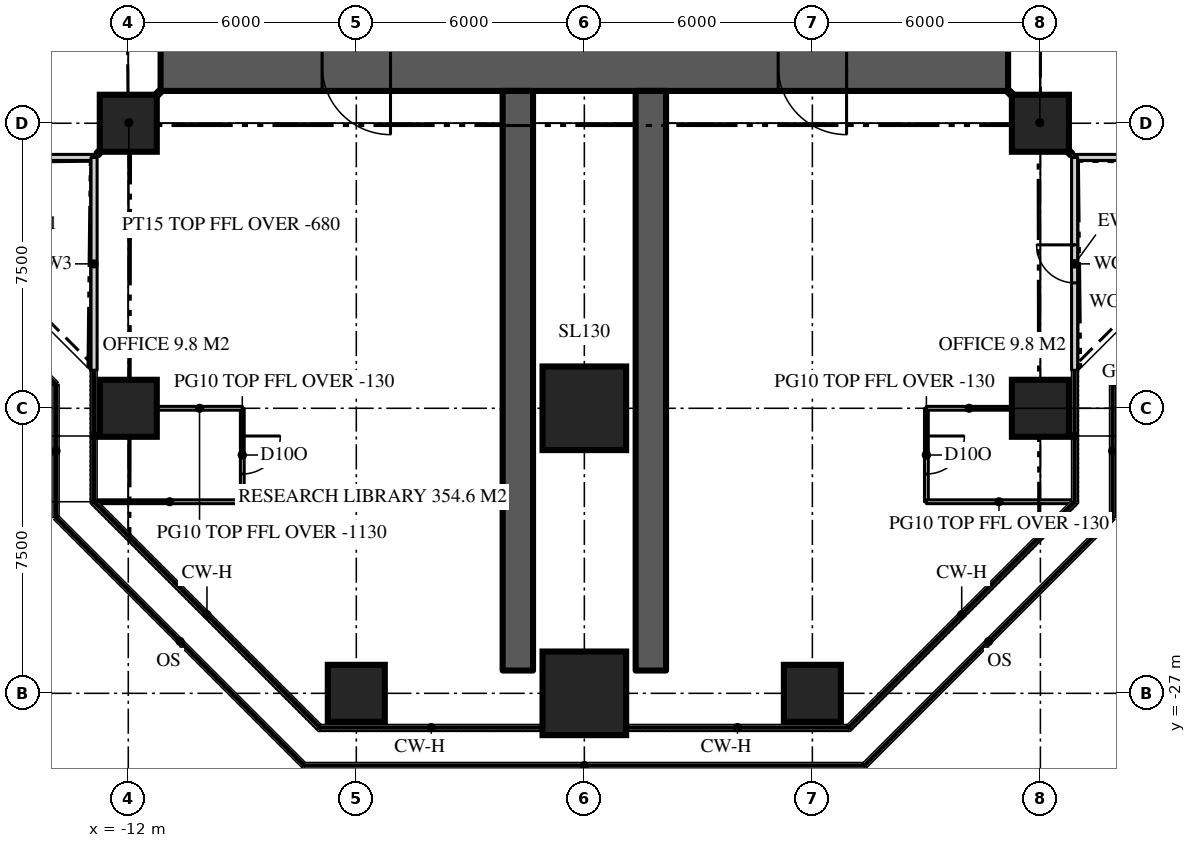
"""IFC4 building model, lengths in metres.
Left out: names, types, materials, properties, quantities, classifications, styles, units other than length and angle.
Written with IfcOpenShell. Run it as: python <this file> out.ifc"""

import sys

from ifc_helpers import new_model, si_unit, direction, frame, frame_2d, origin, origin_2d, place, context, subcontext, project, spatial, rectangle, extrude, element, fill, save


model = new_model("IFC4")
c1 = context("Model", 3, precision=1e-05, world=origin(), true_north=direction((0.0, 1.0)))
c2 = subcontext(c1, "Body", "Model", "MODEL_VIEW")
j1 = project(units=[si_unit("LENGTHUNIT", "METRE"), si_unit("PLANEANGLEUNIT", "RADIAN")], contexts=[c1])
p1 = place(None, origin())
s1 = spatial("IfcSite", under=j1, at=p1, CompositionType="ELEMENT")
p2 = place(p1, origin())
s2 = spatial("IfcBuilding", under=s1, at=p2, CompositionType="ELEMENT")
p3 = place(p2, frame((0.0, 0.0, 232.2)))
s3 = spatial("IfcBuildingStorey", under=s2, at=p3, CompositionType="ELEMENT", Elevation=232.2)
p4 = place(p3, frame((11.15, -10.5, 0.0), z_axis=(0.0, 0.0, 1.0), x_axis=(-1.0, 0.0, 0.0)))
e1 = element("IfcWall", 1, at=p4, inside=s3, PredefinedType="SHEAR", context=c2, shape_type="SweptSolid", body=[
    extrude(rectangle(XDim=22.3, YDim=1.3, at=frame_2d((11.15, 0.0))), origin(), (0.0, 0.0, 1.0), 3.9),
])
p5 = place(p4, frame((16.25, 0.0, 0.0)))
e2 = element("IfcOpeningElement", 2, at=p5, cuts=e1, PredefinedType="OPENING", context=c2, shape_type="SweptSolid", body=[
    extrude(rectangle(XDim=1.8, YDim=2.2, at=frame_2d((0.9, 1.1))), frame((0.0, 0.66, 0.0), z_axis=(0.0, -1.0, 0.0), x_axis=(1.0, 0.0, 0.0)), (0.0, 0.0, 1.0), 1.32),
])
p6 = place(p4, frame((4.25, 0.0, 0.0)))
e3 = element("IfcOpeningElement", 3, at=p6, cuts=e1, PredefinedType="OPENING", context=c2, shape_type="SweptSolid", body=[
    extrude(rectangle(XDim=1.8, YDim=2.2, at=frame_2d((0.9, 1.1))), frame((0.0, 0.66, 0.0), z_axis=(0.0, -1.0, 0.0), x_axis=(1.0, 0.0, 0.0)), (0.0, 0.0, 1.0), 1.32),
])
for number, where, z_axis, x_axis in (
    (4, (-1.75, -11.15, 0.0), (0.0, 0.0, 1.0), (0.0, -1.0, 0.0)),
    (5, (1.75, -11.15, 0.0), (0.0, 0.0, 1.0), (0.0, -1.0, 0.0)),
):
    element("IfcWall", number, at=place(p3, frame(where, z_axis=z_axis, x_axis=x_axis)), inside=s3, PredefinedType="SHEAR", context=c2, shape_type="SweptSolid", body=[
        extrude(rectangle(XDim=15.25, YDim=0.8, at=frame_2d((7.625, 0.0))), origin(), (0.0, 0.0, 1.0), 3.9),
    ])
p7 = place(p3, frame((-6.0, -27.0, 0.0), z_axis=(0.0, 0.0, 1.0), x_axis=(1.0, 0.0, 0.0)))
e6 = element("IfcColumn", 6, at=p7, inside=s3, PredefinedType="COLUMN", context=c2, shape_type="SweptSolid", body=[
    extrude(rectangle(XDim=1.5, YDim=1.5, at=origin_2d()), origin(), (0.0, 0.0, 1.0), 3.9),
])
p8 = place(p3, frame((0.0, -27.0, 0.0), z_axis=(0.0, 0.0, 1.0), x_axis=(1.0, 0.0, 0.0)))
e7 = element("IfcColumn", 7, at=p8, inside=s3, PredefinedType="COLUMN", context=c2, shape_type="SweptSolid", body=[
    extrude(rectangle(XDim=2.2, YDim=2.2, at=origin_2d()), origin(), (0.0, 0.0, 1.0), 3.9),
])
for number, where, z_axis, x_axis in (
    (8, (6.0, -27.0, 0.0), (0.0, 0.0, 1.0), (1.0, 0.0, 0.0)),
    (9, (-12.0, -19.5, 0.0), (0.0, 0.0, 1.0), (1.0, 0.0, 0.0)),
):
    element("IfcColumn", number, at=place(p3, frame(where, z_axis=z_axis, x_axis=x_axis)), inside=s3, PredefinedType="COLUMN", context=c2, shape_type="SweptSolid", body=[
        extrude(rectangle(XDim=1.5, YDim=1.5, at=origin_2d()), origin(), (0.0, 0.0, 1.0), 3.9),
    ])
p9 = place(p3, frame((0.0, -19.5, 0.0), z_axis=(0.0, 0.0, 1.0), x_axis=(1.0, 0.0, 0.0)))
e10 = element("IfcColumn", 10, at=p9, inside=s3, PredefinedType="COLUMN", context=c2, shape_type="SweptSolid", body=[
    extrude(rectangle(XDim=2.2, YDim=2.2, at=origin_2d()), origin(), (0.0, 0.0, 1.0), 3.9),
])
for number, where, z_axis, x_axis in (
    (11, (12.0, -19.5, 0.0), (0.0, 0.0, 1.0), (1.0, 0.0, 0.0)),
    (12, (-12.0, -12.0, 0.0), (0.0, 0.0, 1.0), (1.0, 0.0, 0.0)),
    (13, (12.0, -12.0, 0.0), (0.0, 0.0, 1.0), (1.0, 0.0, 0.0)),
):
    element("IfcColumn", number, at=place(p3, frame(where, z_axis=z_axis, x_axis=x_axis)), inside=s3, PredefinedType="COLUMN", context=c2, shape_type="SweptSolid", body=[
        extrude(rectangle(XDim=1.5, YDim=1.5, at=origin_2d()), origin(), (0.0, 0.0, 1.0), 3.9),
    ])
p10 = place(p3, frame((12.9, -12.9, 0.0), z_axis=(0.0, 0.0, 1.0), x_axis=(1.0, 0.0, 0.0)))
e14 = element("IfcWall", 14, at=p10, inside=s3, PredefinedType="SOLIDWALL", context=c2, shape_type="SweptSolid", body=[
    extrude(rectangle(XDim=5.6, YDim=0.16, at=frame_2d((2.8, 0.0))), origin(), (0.0, 0.0, 1.0), 3.77),
])
p11 = place(p3, frame((-18.5, -12.9, 0.0), z_axis=(0.0, 0.0, 1.0), x_axis=(1.0, 0.0, 0.0)))
e15 = element("IfcWall", 15, at=p11, inside=s3, PredefinedType="SOLIDWALL", context=c2, shape_type="SweptSolid", body=[
    extrude(rectangle(XDim=5.6, YDim=0.16, at=frame_2d((2.8, 0.0))), origin(), (0.0, 0.0, 1.0), 3.77),
])
p12 = place(p11, frame((2.3, 0.0, 0.0)))
e16 = element("IfcOpeningElement", 16, at=p12, cuts=e15, PredefinedType="OPENING", context=c2, shape_type="SweptSolid", body=[
    extrude(rectangle(XDim=1.0, YDim=2.2, at=frame_2d((0.5, 1.1))), frame((0.0, 0.09, 0.0), z_axis=(0.0, -1.0, 0.0), x_axis=(1.0, 0.0, 0.0)), (0.0, 0.0, 1.0), 0.18),
])
p13 = place(p3, frame((-12.9, -12.9, 0.0), z_axis=(0.0, 0.0, 1.0), x_axis=(0.0, -1.0, 0.0)))
e17 = element("IfcWall", 17, at=p13, inside=s3, PredefinedType="SOLIDWALL", context=c2, shape_type="SweptSolid", body=[
    extrude(rectangle(XDim=5.6, YDim=0.16, at=frame_2d((2.8, 0.0))), origin(), (0.0, 0.0, 1.0), 3.77),
])
p14 = place(p3, frame((12.9, -18.5, 0.0), z_axis=(0.0, 0.0, 1.0), x_axis=(0.0, 1.0, 0.0)))
e18 = element("IfcWall", 18, at=p14, inside=s3, PredefinedType="SOLIDWALL", context=c2, shape_type="SweptSolid", body=[
    extrude(rectangle(XDim=5.6, YDim=0.16, at=frame_2d((2.8, 0.0))), origin(), (0.0, 0.0, 1.0), 3.77),
])
p15 = place(p14, frame((2.3, 0.0, 0.0)))
e19 = element("IfcOpeningElement", 19, at=p15, cuts=e18, PredefinedType="OPENING", context=c2, shape_type="SweptSolid", body=[
    extrude(rectangle(XDim=1.0, YDim=2.2, at=frame_2d((0.5, 1.1))), frame((0.0, 0.09, 0.0), z_axis=(0.0, -1.0, 0.0), x_axis=(1.0, 0.0, 0.0)), (0.0, 0.0, 1.0), 0.18),
])
p16 = place(p3, frame((9.0, -19.5, 0.0), z_axis=(0.0, 0.0, 1.0), x_axis=(0.0, -1.0, 0.0)))
e20 = element("IfcWall", 20, at=p16, inside=s3, PredefinedType="PARTITIONING", context=c2, shape_type="SweptSolid", body=[
    extrude(rectangle(XDim=2.459, YDim=0.1, at=frame_2d((1.229, 0.0))), origin(), (0.0, 0.0, 1.0), 3.77),
])
p17 = place(p16, frame((0.729, 0.0, 0.0)))
e21 = element("IfcOpeningElement", 21, at=p17, cuts=e20, PredefinedType="OPENING", context=c2, shape_type="SweptSolid", body=[
    extrude(rectangle(XDim=1.0, YDim=2.2, at=frame_2d((0.5, 1.1))), frame((0.0, 0.06, 0.0), z_axis=(0.0, -1.0, 0.0), x_axis=(1.0, 0.0, 0.0)), (0.0, 0.0, 1.0), 0.12),
])
p18 = place(p3, frame((9.0, -19.5, 0.0), z_axis=(0.0, 0.0, 1.0), x_axis=(1.0, 0.0, 0.0)))
e22 = element("IfcWall", 22, at=p18, inside=s3, PredefinedType="PARTITIONING", context=c2, shape_type="SweptSolid", body=[
    extrude(rectangle(XDim=2.25, YDim=0.1, at=frame_2d((1.125, 0.0))), origin(), (0.0, 0.0, 1.0), 2.77),
])
p19 = place(p3, frame((9.0, -21.959, 0.0), z_axis=(0.0, 0.0, 1.0), x_axis=(1.0, 0.0, 0.0)))
e23 = element("IfcWall", 23, at=p19, inside=s3, PredefinedType="PARTITIONING", context=c2, shape_type="SweptSolid", body=[
    extrude(rectangle(XDim=3.82, YDim=0.1, at=frame_2d((1.91, 0.0))), origin(), (0.0, 0.0, 1.0), 3.77),
])
p20 = place(p3, frame((-9.0, -19.5, 0.0), z_axis=(0.0, 0.0, 1.0), x_axis=(0.0, -1.0, 0.0)))
e24 = element("IfcWall", 24, at=p20, inside=s3, PredefinedType="PARTITIONING", context=c2, shape_type="SweptSolid", body=[
    extrude(rectangle(XDim=2.459, YDim=0.1, at=frame_2d((1.229, 0.0))), origin(), (0.0, 0.0, 1.0), 3.77),
])
p21 = place(p20, frame((0.729, 0.0, 0.0)))
e25 = element("IfcOpeningElement", 25, at=p21, cuts=e24, PredefinedType="OPENING", context=c2, shape_type="SweptSolid", body=[
    extrude(rectangle(XDim=1.0, YDim=2.2, at=frame_2d((0.5, 1.1))), frame((0.0, 0.06, 0.0), z_axis=(0.0, -1.0, 0.0), x_axis=(1.0, 0.0, 0.0)), (0.0, 0.0, 1.0), 0.12),
])
p22 = place(p3, frame((-9.0, -19.5, 0.0), z_axis=(0.0, 0.0, 1.0), x_axis=(-1.0, 0.0, 0.0)))
e26 = element("IfcWall", 26, at=p22, inside=s3, PredefinedType="PARTITIONING", context=c2, shape_type="SweptSolid", body=[
    extrude(rectangle(XDim=2.25, YDim=0.1, at=frame_2d((1.125, 0.0))), origin(), (0.0, 0.0, 1.0), 2.77),
])
p23 = place(p3, frame((-9.0, -21.959, 0.0), z_axis=(0.0, 0.0, 1.0), x_axis=(-1.0, 0.0, 0.0)))
e27 = element("IfcWall", 27, at=p23, inside=s3, PredefinedType="PARTITIONING", context=c2, shape_type="SweptSolid", body=[
    extrude(rectangle(XDim=3.82, YDim=0.1, at=frame_2d((1.91, 0.0))), origin(), (0.0, 0.0, 1.0), 3.77),
])
for number, where, z_axis, x_axis in (
    (28, (-11.15, -11.15, 0.0), (0.0, 0.0, 1.0), (-0.707, -0.707, 0.0)),
    (29, (11.15, -11.15, 0.0), (0.0, 0.0, 1.0), (0.707, -0.707, 0.0)),
):
    element("IfcWall", number, at=place(p3, frame(where, z_axis=z_axis, x_axis=x_axis)), inside=s3, PredefinedType="PARTITIONING", context=c2, shape_type="SweptSolid", body=[
        extrude(rectangle(XDim=2.362, YDim=0.15, at=frame_2d((1.181, 0.0))), origin(), (0.0, 0.0, 1.0), 3.22),
    ])
p24 = place(p15, origin())
e30 = element("IfcDoor", 30, at=p24, inside=s3, OperationType="SINGLE_SWING_RIGHT", PredefinedType="DOOR", context=c2, shape_type="SweptSolid", body=[
    extrude(rectangle(XDim=1.0, YDim=2.2, at=frame_2d((0.5, 1.1))), frame((0.0, 0.025, 0.0), z_axis=(0.0, -1.0, 0.0), x_axis=(1.0, 0.0, 0.0)), (0.0, 0.0, 1.0), 0.05),
])
fill(e19, e30)
p25 = place(p5, origin())
e31 = element("IfcDoor", 31, at=p25, inside=s3, OperationType="DOUBLE_DOOR_DOUBLE_SWING", PredefinedType="DOOR", context=c2, shape_type="SweptSolid", body=[
    extrude(rectangle(XDim=1.8, YDim=2.2, at=frame_2d((0.9, 1.1))), frame((0.0, 0.025, 0.0), z_axis=(0.0, -1.0, 0.0), x_axis=(1.0, 0.0, 0.0)), (0.0, 0.0, 1.0), 0.05),
])
fill(e2, e31)
p26 = place(p6, origin())
e32 = element("IfcDoor", 32, at=p26, inside=s3, OperationType="DOUBLE_DOOR_DOUBLE_SWING", PredefinedType="DOOR", context=c2, shape_type="SweptSolid", body=[
    extrude(rectangle(XDim=1.8, YDim=2.2, at=frame_2d((0.9, 1.1))), frame((0.0, 0.025, 0.0), z_axis=(0.0, -1.0, 0.0), x_axis=(1.0, 0.0, 0.0)), (0.0, 0.0, 1.0), 0.05),
])
fill(e3, e32)
p27 = place(p17, origin())
e33 = element("IfcDoor", 33, at=p27, inside=s3, OperationType="SINGLE_SWING_LEFT", PredefinedType="DOOR", context=c2, shape_type="SweptSolid", body=[
    extrude(rectangle(XDim=1.0, YDim=2.2, at=frame_2d((0.5, 1.1))), frame((0.0, 0.025, 0.0), z_axis=(0.0, -1.0, 0.0), x_axis=(1.0, 0.0, 0.0)), (0.0, 0.0, 1.0), 0.05),
])
fill(e21, e33)
p28 = place(p21, origin())
e34 = element("IfcDoor", 34, at=p28, inside=s3, OperationType="SINGLE_SWING_LEFT", PredefinedType="DOOR", context=c2, shape_type="SweptSolid", body=[
    extrude(rectangle(XDim=1.0, YDim=2.2, at=frame_2d((0.5, 1.1))), frame((0.0, 0.025, 0.0), z_axis=(0.0, -1.0, 0.0), x_axis=(1.0, 0.0, 0.0)), (0.0, 0.0, 1.0), 0.05),
])
fill(e25, e34)
save(model, sys.argv[1])
